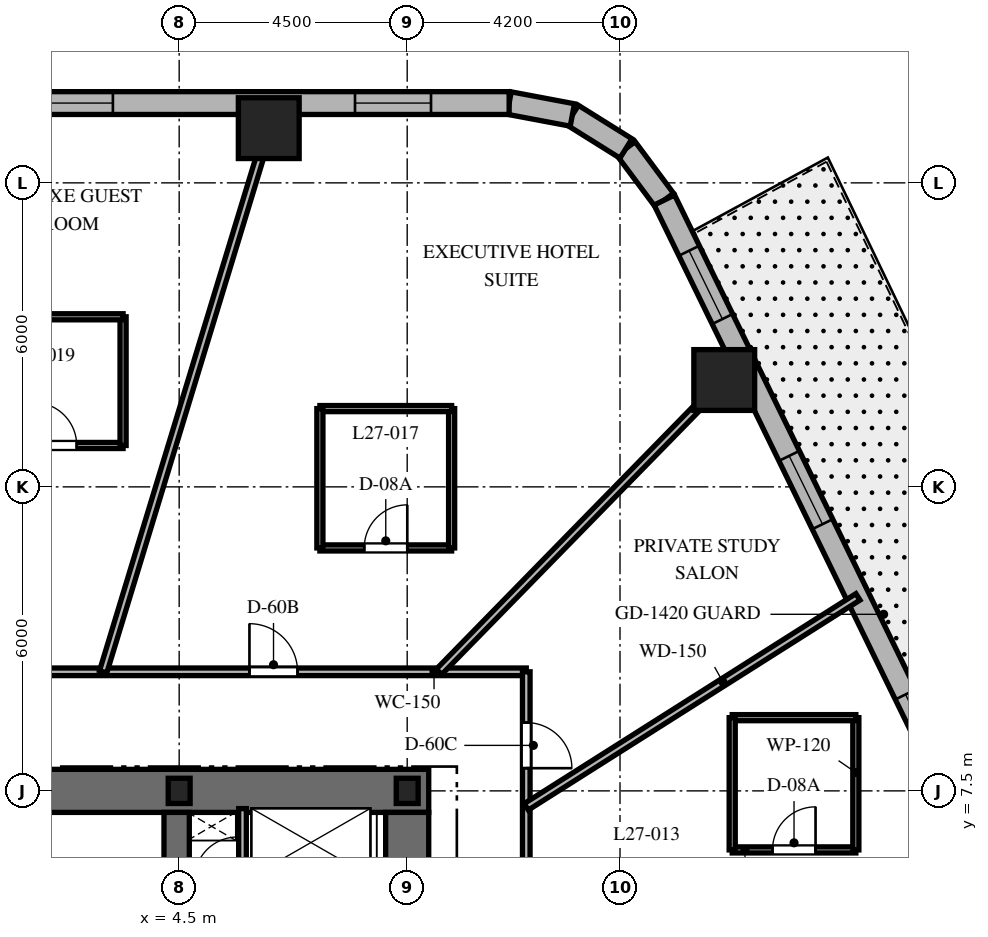
"""IFC4 building model, lengths in metres.
Left out: names, types, materials, properties, quantities, classifications, styles, units other than length and angle.
Written with IfcOpenShell. Run it as: python <this file> out.ifc"""

import sys

from ifc_helpers import new_model, si_unit, direction, frame, frame_2d, origin, origin_2d, place, context, subcontext, project, spatial, rectangle, i_section, extrude, element, fill, save


model = new_model("IFC4")
c1 = context("Model", 3, precision=1e-05, world=origin(), true_north=direction((0.0, 1.0)))
c2 = subcontext(c1, "Body", "Model", "MODEL_VIEW")
j1 = project(units=[si_unit("LENGTHUNIT", "METRE"), si_unit("PLANEANGLEUNIT", "RADIAN")], contexts=[c1])
p1 = place(None, origin())
s1 = spatial("IfcSite", under=j1, at=p1, CompositionType="ELEMENT")
p2 = place(p1, origin())
s2 = spatial("IfcBuilding", under=s1, at=p2, CompositionType="ELEMENT")
p3 = place(p2, frame((0.0, 0.0, 113.6)))
s3 = spatial("IfcBuildingStorey", under=s2, at=p3, CompositionType="ELEMENT", Elevation=113.6)
p4 = place(p3, frame((1.85, 7.5, 0.0), z_axis=(0.0, 0.0, 1.0), x_axis=(1.0, 0.0, 0.0)))
e1 = element("IfcWall", 1, at=p4, inside=s3, PredefinedType="SHEAR", context=c2, shape_type="SweptSolid", body=[
    extrude(rectangle(XDim=7.575, YDim=0.85, at=frame_2d((3.788, 0.0))), origin(), (0.0, 0.0, 1.0), 3.7),
])
p5 = place(p3, frame((9.0, -7.075, 0.0), z_axis=(0.0, 0.0, 1.0), x_axis=(0.0, 1.0, 0.0)))
e2 = element("IfcWall", 2, at=p5, inside=s3, PredefinedType="SHEAR", context=c2, shape_type="SweptSolid", body=[
    extrude(rectangle(XDim=14.15, YDim=0.85, at=frame_2d((7.075, 0.0))), origin(), (0.0, 0.0, 1.0), 3.7),
])
p6 = place(p5, frame((10.2, 0.0, 0.0)))
e3 = element("IfcOpeningElement", 3, at=p6, cuts=e2, PredefinedType="OPENING", context=c2, shape_type="SweptSolid", body=[
    extrude(rectangle(XDim=1.05, YDim=2.15, at=frame_2d((0.525, 1.075))), frame((0.0, 0.435, 0.0), z_axis=(0.0, -1.0, 0.0), x_axis=(1.0, 0.0, 0.0)), (0.0, 0.0, 1.0), 0.87),
])
p7 = place(p3, frame((4.45, 2.25, 0.0), z_axis=(0.0, 0.0, 1.0), x_axis=(0.0, 1.0, 0.0)))
e4 = element("IfcWall", 4, at=p7, inside=s3, PredefinedType="SHEAR", context=c2, shape_type="SweptSolid", body=[
    extrude(rectangle(XDim=4.825, YDim=0.5, at=frame_2d((2.413, 0.0))), origin(), (0.0, 0.0, 1.0), 3.7),
])
for number, where, z_axis, x_axis in (
    (5, (9.0, 7.5, 0.0), (0.0, 0.0, 1.0), (1.0, 0.0, 0.0)),
    (6, (4.5, 7.5, 0.0), (0.0, 0.0, 1.0), (1.0, 0.0, 0.0)),
):
    element("IfcColumn", number, at=place(p3, frame(where, z_axis=z_axis, x_axis=x_axis)), inside=s3, PredefinedType="COLUMN", context=c2, shape_type="SweptSolid", body=[
        extrude(i_section(OverallWidth=0.432, OverallDepth=0.498, WebThickness=0.056, FlangeThickness=0.089, at=origin_2d()), origin(), (0.0, 0.0, 1.0), 3.7),
    ])
for number, where, z_axis, x_axis in (
    (7, (15.257, 15.609, 0.0), (0.0, 0.0, 1.0), (1.0, 0.0, 0.0)),
    (8, (6.268, 20.58, 0.0), (0.0, 0.0, 1.0), (1.0, 0.0, 0.0)),
):
    element("IfcColumn", number, at=place(p3, frame(where, z_axis=z_axis, x_axis=x_axis)), inside=s3, PredefinedType="COLUMN", context=c2, shape_type="SweptSolid", body=[
        extrude(rectangle(XDim=1.2, YDim=1.2, at=origin_2d()), origin(), (0.0, 0.0, 1.0), 3.7),
    ])
p8 = place(p3, frame((14.076, 19.161, 0.0), z_axis=(0.0, 0.0, 1.0), x_axis=(-0.597226657159, 0.802072515412, 0.0)))
e9 = element("IfcWall", 9, at=p8, inside=s3, PredefinedType="SOLIDWALL", context=c2, shape_type="SweptSolid", body=[
    extrude(rectangle(XDim=1.269, YDim=0.45, at=frame_2d((0.635, 0.0))), origin(), (0.0, 0.0, 1.0), 3.4),
])
p9 = place(p3, frame((13.318, 20.179, 0.0), z_axis=(0.0, 0.0, 1.0), x_axis=(-0.848031272749, 0.529946186362, 0.0)))
e10 = element("IfcWall", 10, at=p9, inside=s3, PredefinedType="SOLIDWALL", context=c2, shape_type="SweptSolid", body=[
    extrude(rectangle(XDim=1.248, YDim=0.45, at=frame_2d((0.624, 0.0))), origin(), (0.0, 0.0, 1.0), 3.4),
])
p10 = place(p3, frame((12.259, 20.84, 0.0), z_axis=(0.0, 0.0, 1.0), x_axis=(-0.982730354425, 0.185043374624, 0.0)))
e11 = element("IfcWall", 11, at=p10, inside=s3, PredefinedType="SOLIDWALL", context=c2, shape_type="SweptSolid", body=[
    extrude(rectangle(XDim=1.269, YDim=0.45, at=frame_2d((0.635, 0.0))), origin(), (0.0, 0.0, 1.0), 3.4),
])
p11 = place(p3, frame((22.238, 2.427, 0.0), z_axis=(0.0, 0.0, 1.0), x_axis=(-0.438374803278, 0.898792262901, 0.0)))
e12 = element("IfcWall", 12, at=p11, inside=s3, PredefinedType="SOLIDWALL", context=c2, shape_type="SweptSolid", body=[
    extrude(rectangle(XDim=18.618, YDim=0.45, at=frame_2d((9.309, 0.0))), origin(), (0.0, 0.0, 1.0), 3.4),
])
p12 = place(p11, frame((4.62, 0.0, 0.0)))
e13 = element("IfcOpeningElement", 13, at=p12, cuts=e12, PredefinedType="OPENING", context=c2, shape_type="SweptSolid", body=[
    extrude(rectangle(XDim=1.0, YDim=2.15, at=frame_2d((0.5, 1.075))), frame((0.0, 0.235, 0.0), z_axis=(0.0, -1.0, 0.0), x_axis=(1.0, 0.0, 0.0)), (0.0, 0.0, 1.0), 0.47),
])
p13 = place(p11, frame((6.262, 0.0, 0.8)))
e14 = element("IfcOpeningElement", 14, at=p13, cuts=e12, PredefinedType="OPENING", context=c2, shape_type="SweptSolid", body=[
    extrude(rectangle(XDim=1.5, YDim=1.8, at=frame_2d((0.75, 0.9))), frame((0.0, 0.235, 0.0), z_axis=(0.0, -1.0, 0.0), x_axis=(1.0, 0.0, 0.0)), (0.0, 0.0, 1.0), 0.47),
])
p14 = place(p11, frame((11.501, 0.0, 0.8)))
e15 = element("IfcOpeningElement", 15, at=p14, cuts=e12, PredefinedType="OPENING", context=c2, shape_type="SweptSolid", body=[
    extrude(rectangle(XDim=1.5, YDim=1.8, at=frame_2d((0.75, 0.9))), frame((0.0, 0.235, 0.0), z_axis=(0.0, -1.0, 0.0), x_axis=(1.0, 0.0, 0.0)), (0.0, 0.0, 1.0), 0.47),
])
p15 = place(p11, frame((16.006, 0.0, 0.8)))
e16 = element("IfcOpeningElement", 16, at=p15, cuts=e12, PredefinedType="OPENING", context=c2, shape_type="SweptSolid", body=[
    extrude(rectangle(XDim=1.5, YDim=1.8, at=frame_2d((0.75, 0.9))), frame((0.0, 0.235, 0.0), z_axis=(0.0, -1.0, 0.0), x_axis=(1.0, 0.0, 0.0)), (0.0, 0.0, 1.0), 0.47),
])
p16 = place(p11, frame((1.163, 0.0, 0.8)))
e17 = element("IfcOpeningElement", 17, at=p16, cuts=e12, PredefinedType="OPENING", context=c2, shape_type="SweptSolid", body=[
    extrude(rectangle(XDim=1.5, YDim=1.8, at=frame_2d((0.75, 0.9))), frame((0.0, 0.235, 0.0), z_axis=(0.0, -1.0, 0.0), x_axis=(1.0, 0.0, 0.0)), (0.0, 0.0, 1.0), 0.47),
])
p17 = place(p3, frame((11.012, 21.075, 0.0), z_axis=(0.0, 0.0, 1.0), x_axis=(-1.0, 0.0, 0.0)))
e18 = element("IfcWall", 18, at=p17, inside=s3, PredefinedType="SOLIDWALL", context=c2, shape_type="SweptSolid", body=[
    extrude(rectangle(XDim=23.782, YDim=0.45, at=frame_2d((11.891, 0.0))), origin(), (0.0, 0.0, 1.0), 3.4),
])
p18 = place(p17, frame((1.542, 0.0, 0.8)))
e19 = element("IfcOpeningElement", 19, at=p18, cuts=e18, PredefinedType="OPENING", context=c2, shape_type="SweptSolid", body=[
    extrude(rectangle(XDim=1.5, YDim=1.8, at=frame_2d((0.75, 0.9))), frame((0.0, 0.235, 0.0), z_axis=(0.0, -1.0, 0.0), x_axis=(1.0, 0.0, 0.0)), (0.0, 0.0, 1.0), 0.47),
])
p19 = place(p17, frame((7.82, 0.0, 0.8)))
e20 = element("IfcOpeningElement", 20, at=p19, cuts=e18, PredefinedType="OPENING", context=c2, shape_type="SweptSolid", body=[
    extrude(rectangle(XDim=1.5, YDim=1.8, at=frame_2d((0.75, 0.9))), frame((0.0, 0.235, 0.0), z_axis=(0.0, -1.0, 0.0), x_axis=(1.0, 0.0, 0.0)), (0.0, 0.0, 1.0), 0.47),
])
p20 = place(p17, frame((14.388, 0.0, 0.8)))
e21 = element("IfcOpeningElement", 21, at=p20, cuts=e18, PredefinedType="OPENING", context=c2, shape_type="SweptSolid", body=[
    extrude(rectangle(XDim=1.5, YDim=1.8, at=frame_2d((0.75, 0.9))), frame((0.0, 0.235, 0.0), z_axis=(0.0, -1.0, 0.0), x_axis=(1.0, 0.0, 0.0)), (0.0, 0.0, 1.0), 0.47),
])
p21 = place(p17, frame((20.741, 0.0, 0.8)))
e22 = element("IfcOpeningElement", 22, at=p21, cuts=e18, PredefinedType="OPENING", context=c2, shape_type="SweptSolid", body=[
    extrude(rectangle(XDim=1.5, YDim=1.8, at=frame_2d((0.75, 0.9))), frame((0.0, 0.235, 0.0), z_axis=(0.0, -1.0, 0.0), x_axis=(1.0, 0.0, 0.0)), (0.0, 0.0, 1.0), 0.47),
])
p22 = place(p3, frame((5.75, 5.74, 0.0), z_axis=(0.0, 0.0, 1.0), x_axis=(0.0, 1.0, 0.0)))
e23 = element("IfcWall", 23, at=p22, inside=s3, PredefinedType="PARTITIONING", context=c2, shape_type="SweptSolid", body=[
    extrude(rectangle(XDim=1.41, YDim=0.15, at=frame_2d((0.705, 0.0))), origin(), (0.0, 0.0, 1.0), 3.4),
])
p23 = place(p3, frame((-11.35, 9.85, 0.0), z_axis=(0.0, 0.0, 1.0), x_axis=(1.0, 0.0, 0.0)))
e24 = element("IfcWall", 24, at=p23, inside=s3, PredefinedType="PARTITIONING", context=c2, shape_type="SweptSolid", body=[
    extrude(rectangle(XDim=22.7, YDim=0.15, at=frame_2d((11.35, 0.0))), origin(), (0.0, 0.0, 1.0), 2.84),
])
p24 = place(p23, frame((17.237, 0.0, 0.0)))
e25 = element("IfcOpeningElement", 25, at=p24, cuts=e24, PredefinedType="OPENING", context=c2, shape_type="SweptSolid", body=[
    extrude(rectangle(XDim=0.95, YDim=2.03, at=frame_2d((0.475, 1.015))), frame((0.0, 0.085, 0.0), z_axis=(0.0, -1.0, 0.0), x_axis=(1.0, 0.0, 0.0)), (0.0, 0.0, 1.0), 0.17),
])
p25 = place(p23, frame((12.192, 0.0, 0.0)))
e26 = element("IfcOpeningElement", 26, at=p25, cuts=e24, PredefinedType="OPENING", context=c2, shape_type="SweptSolid", body=[
    extrude(rectangle(XDim=0.95, YDim=2.03, at=frame_2d((0.475, 1.015))), frame((0.0, 0.085, 0.0), z_axis=(0.0, -1.0, 0.0), x_axis=(1.0, 0.0, 0.0)), (0.0, 0.0, 1.0), 0.17),
])
p26 = place(p23, frame((8.757, 0.0, 0.0)))
e27 = element("IfcOpeningElement", 27, at=p26, cuts=e24, PredefinedType="OPENING", context=c2, shape_type="SweptSolid", body=[
    extrude(rectangle(XDim=0.95, YDim=2.03, at=frame_2d((0.475, 1.015))), frame((0.0, 0.085, 0.0), z_axis=(0.0, -1.0, 0.0), x_axis=(1.0, 0.0, 0.0)), (0.0, 0.0, 1.0), 0.17),
])
p27 = place(p23, frame((3.399, 0.0, 0.0)))
e28 = element("IfcOpeningElement", 28, at=p27, cuts=e24, PredefinedType="OPENING", context=c2, shape_type="SweptSolid", body=[
    extrude(rectangle(XDim=0.95, YDim=2.03, at=frame_2d((0.475, 1.015))), frame((0.0, 0.085, 0.0), z_axis=(0.0, -1.0, 0.0), x_axis=(1.0, 0.0, 0.0)), (0.0, 0.0, 1.0), 0.17),
])
p28 = place(p3, frame((11.35, 9.85, 0.0), z_axis=(0.0, 0.0, 1.0), x_axis=(0.0, -1.0, 0.0)))
e29 = element("IfcWall", 29, at=p28, inside=s3, PredefinedType="PARTITIONING", context=c2, shape_type="SweptSolid", body=[
    extrude(rectangle(XDim=19.7, YDim=0.15, at=frame_2d((9.85, 0.0))), origin(), (0.0, 0.0, 1.0), 2.84),
])
p29 = place(p28, frame((4.199, 0.0, 0.0)))
e30 = element("IfcOpeningElement", 30, at=p29, cuts=e29, PredefinedType="OPENING", context=c2, shape_type="SweptSolid", body=[
    extrude(rectangle(XDim=0.95, YDim=2.03, at=frame_2d((0.475, 1.015))), frame((0.0, 0.085, 0.0), z_axis=(0.0, -1.0, 0.0), x_axis=(1.0, 0.0, 0.0)), (0.0, 0.0, 1.0), 0.17),
])
p30 = place(p28, frame((1.002, 0.0, 0.0)))
e31 = element("IfcOpeningElement", 31, at=p30, cuts=e29, PredefinedType="OPENING", context=c2, shape_type="SweptSolid", body=[
    extrude(rectangle(XDim=0.9, YDim=2.03, at=frame_2d((0.45, 1.015))), frame((0.0, 0.085, 0.0), z_axis=(0.0, -1.0, 0.0), x_axis=(1.0, 0.0, 0.0)), (0.0, 0.0, 1.0), 0.17),
])
p31 = place(p28, frame((17.197, 0.0, 0.0)))
e32 = element("IfcOpeningElement", 32, at=p31, cuts=e29, PredefinedType="OPENING", context=c2, shape_type="SweptSolid", body=[
    extrude(rectangle(XDim=0.9, YDim=2.03, at=frame_2d((0.45, 1.015))), frame((0.0, 0.085, 0.0), z_axis=(0.0, -1.0, 0.0), x_axis=(1.0, 0.0, 0.0)), (0.0, 0.0, 1.0), 0.17),
])
p32 = place(p28, frame((13.408, 0.0, 0.0)))
e33 = element("IfcOpeningElement", 33, at=p32, cuts=e29, PredefinedType="OPENING", context=c2, shape_type="SweptSolid", body=[
    extrude(rectangle(XDim=0.95, YDim=2.03, at=frame_2d((0.475, 1.015))), frame((0.0, 0.085, 0.0), z_axis=(0.0, -1.0, 0.0), x_axis=(1.0, 0.0, 0.0)), (0.0, 0.0, 1.0), 0.17),
])
p33 = place(p28, frame((8.836, 0.0, 0.0)))
e34 = element("IfcOpeningElement", 34, at=p33, cuts=e29, PredefinedType="OPENING", context=c2, shape_type="SweptSolid", body=[
    extrude(rectangle(XDim=0.95, YDim=2.03, at=frame_2d((0.475, 1.015))), frame((0.0, 0.085, 0.0), z_axis=(0.0, -1.0, 0.0), x_axis=(1.0, 0.0, 0.0)), (0.0, 0.0, 1.0), 0.17),
])
p34 = place(p3, frame((11.35, 7.185, 0.0), z_axis=(0.0, 0.0, 1.0), x_axis=(0.844928274737, 0.534879622485, 0.0)))
e35 = element("IfcWall", 35, at=p34, inside=s3, PredefinedType="PARTITIONING", context=c2, shape_type="SweptSolid", body=[
    extrude(rectangle(XDim=7.747, YDim=0.15, at=frame_2d((3.874, 0.0))), origin(), (0.0, 0.0, 1.0), 2.54),
])
p35 = place(p3, frame((9.628, 9.85, 0.0), z_axis=(0.0, 0.0, 1.0), x_axis=(0.698992824326, 0.715128681805, 0.0)))
e36 = element("IfcWall", 36, at=p35, inside=s3, PredefinedType="PARTITIONING", context=c2, shape_type="SweptSolid", body=[
    extrude(rectangle(XDim=8.579, YDim=0.15, at=frame_2d((4.29, 0.0))), origin(), (0.0, 0.0, 1.0), 2.54),
])
p36 = place(p3, frame((3.0, 9.85, 0.0), z_axis=(0.0, 0.0, 1.0), x_axis=(0.291352035382, 0.95661590593, 0.0)))
e37 = element("IfcWall", 37, at=p36, inside=s3, PredefinedType="PARTITIONING", context=c2, shape_type="SweptSolid", body=[
    extrude(rectangle(XDim=11.734, YDim=0.15, at=frame_2d((5.867, 0.0))), origin(), (0.0, 0.0, 1.0), 2.54),
])
p37 = place(p3, frame((15.414, 6.335, 0.0), z_axis=(0.0, 0.0, 1.0), x_axis=(1.0, 0.0, 0.0)))
e38 = element("IfcWall", 38, at=p37, inside=s3, PredefinedType="PARTITIONING", context=c2, shape_type="SweptSolid", body=[
    extrude(rectangle(XDim=2.44, YDim=0.12, at=frame_2d((1.22, 0.0))), origin(), (0.0, 0.0, 1.0), 2.84),
])
p38 = place(p37, frame((0.795, 0.0, 0.0)))
e39 = element("IfcOpeningElement", 39, at=p38, cuts=e38, PredefinedType="OPENING", context=c2, shape_type="SweptSolid", body=[
    extrude(rectangle(XDim=0.85, YDim=2.03, at=frame_2d((0.425, 1.015))), frame((0.0, 0.07, 0.0), z_axis=(0.0, -1.0, 0.0), x_axis=(1.0, 0.0, 0.0)), (0.0, 0.0, 1.0), 0.14),
])
p39 = place(p3, frame((17.854, 6.335, 0.0), z_axis=(0.0, 0.0, 1.0), x_axis=(0.0, 1.0, 0.0)))
e40 = element("IfcWall", 40, at=p39, inside=s3, PredefinedType="PARTITIONING", context=c2, shape_type="SweptSolid", body=[
    extrude(rectangle(XDim=2.61, YDim=0.12, at=frame_2d((1.305, 0.0))), origin(), (0.0, 0.0, 1.0), 3.4),
])
p40 = place(p3, frame((17.854, 8.945, 0.0), z_axis=(0.0, 0.0, 1.0), x_axis=(-1.0, 0.0, 0.0)))
e41 = element("IfcWall", 41, at=p40, inside=s3, PredefinedType="PARTITIONING", context=c2, shape_type="SweptSolid", body=[
    extrude(rectangle(XDim=2.44, YDim=0.12, at=frame_2d((1.22, 0.0))), origin(), (0.0, 0.0, 1.0), 3.4),
])
p41 = place(p3, frame((15.414, 8.945, 0.0), z_axis=(0.0, 0.0, 1.0), x_axis=(0.0, -1.0, 0.0)))
e42 = element("IfcWall", 42, at=p41, inside=s3, PredefinedType="PARTITIONING", context=c2, shape_type="SweptSolid", body=[
    extrude(rectangle(XDim=2.61, YDim=0.12, at=frame_2d((1.305, 0.0))), origin(), (0.0, 0.0, 1.0), 2.84),
])
p42 = place(p3, frame((7.277, 12.295, 0.0), z_axis=(0.0, 0.0, 1.0), x_axis=(1.0, 0.0, 0.0)))
e43 = element("IfcWall", 43, at=p42, inside=s3, PredefinedType="PARTITIONING", context=c2, shape_type="SweptSolid", body=[
    extrude(rectangle(XDim=2.6, YDim=0.12, at=frame_2d((1.3, 0.0))), origin(), (0.0, 0.0, 1.0), 2.84),
])
p43 = place(p42, frame((0.875, 0.0, 0.0)))
e44 = element("IfcOpeningElement", 44, at=p43, cuts=e43, PredefinedType="OPENING", context=c2, shape_type="SweptSolid", body=[
    extrude(rectangle(XDim=0.85, YDim=2.03, at=frame_2d((0.425, 1.015))), frame((0.0, 0.07, 0.0), z_axis=(0.0, -1.0, 0.0), x_axis=(1.0, 0.0, 0.0)), (0.0, 0.0, 1.0), 0.14),
])
p44 = place(p3, frame((9.877, 12.295, 0.0), z_axis=(0.0, 0.0, 1.0), x_axis=(0.0, 1.0, 0.0)))
e45 = element("IfcWall", 45, at=p44, inside=s3, PredefinedType="PARTITIONING", context=c2, shape_type="SweptSolid", body=[
    extrude(rectangle(XDim=2.75, YDim=0.12, at=frame_2d((1.375, 0.0))), origin(), (0.0, 0.0, 1.0), 2.972),
])
p45 = place(p3, frame((9.877, 15.045, 0.0), z_axis=(0.0, 0.0, 1.0), x_axis=(-1.0, 0.0, 0.0)))
e46 = element("IfcWall", 46, at=p45, inside=s3, PredefinedType="PARTITIONING", context=c2, shape_type="SweptSolid", body=[
    extrude(rectangle(XDim=2.6, YDim=0.12, at=frame_2d((1.3, 0.0))), origin(), (0.0, 0.0, 1.0), 2.972),
])
p46 = place(p3, frame((7.277, 15.045, 0.0), z_axis=(0.0, 0.0, 1.0), x_axis=(0.0, -1.0, 0.0)))
e47 = element("IfcWall", 47, at=p46, inside=s3, PredefinedType="PARTITIONING", context=c2, shape_type="SweptSolid", body=[
    extrude(rectangle(XDim=2.75, YDim=0.12, at=frame_2d((1.375, 0.0))), origin(), (0.0, 0.0, 1.0), 2.84),
])
p47 = place(p3, frame((0.713, 14.317, 0.0), z_axis=(0.0, 0.0, 1.0), x_axis=(1.0, 0.0, 0.0)))
e48 = element("IfcWall", 48, at=p47, inside=s3, PredefinedType="PARTITIONING", context=c2, shape_type="SweptSolid", body=[
    extrude(rectangle(XDim=2.68, YDim=0.12, at=frame_2d((1.34, 0.0))), origin(), (0.0, 0.0, 1.0), 3.4),
])
p48 = place(p47, frame((0.915, 0.0, 0.0)))
e49 = element("IfcOpeningElement", 49, at=p48, cuts=e48, PredefinedType="OPENING", context=c2, shape_type="SweptSolid", body=[
    extrude(rectangle(XDim=0.85, YDim=2.03, at=frame_2d((0.425, 1.015))), frame((0.0, 0.07, 0.0), z_axis=(0.0, -1.0, 0.0), x_axis=(1.0, 0.0, 0.0)), (0.0, 0.0, 1.0), 0.14),
])
p49 = place(p3, frame((3.393, 14.317, 0.0), z_axis=(0.0, 0.0, 1.0), x_axis=(0.0, 1.0, 0.0)))
e50 = element("IfcWall", 50, at=p49, inside=s3, PredefinedType="PARTITIONING", context=c2, shape_type="SweptSolid", body=[
    extrude(rectangle(XDim=2.54, YDim=0.12, at=frame_2d((1.27, 0.0))), origin(), (0.0, 0.0, 1.0), 2.84),
])
p50 = place(p3, frame((3.393, 16.857, 0.0), z_axis=(0.0, 0.0, 1.0), x_axis=(-1.0, 0.0, 0.0)))
e51 = element("IfcWall", 51, at=p50, inside=s3, PredefinedType="PARTITIONING", context=c2, shape_type="SweptSolid", body=[
    extrude(rectangle(XDim=2.68, YDim=0.12, at=frame_2d((1.34, 0.0))), origin(), (0.0, 0.0, 1.0), 3.4),
])
p51 = place(p13, origin())
e52 = element("IfcWindow", 52, at=p51, inside=s3, PartitioningType="SINGLE_PANEL", PredefinedType="WINDOW", context=c2, shape_type="SweptSolid", body=[
    extrude(rectangle(XDim=1.5, YDim=1.8, at=frame_2d((0.75, 0.9))), frame((0.0, 0.03, 0.0), z_axis=(0.0, -1.0, 0.0), x_axis=(1.0, 0.0, 0.0)), (0.0, 0.0, 1.0), 0.06),
])
fill(e14, e52)
p52 = place(p14, origin())
e53 = element("IfcWindow", 53, at=p52, inside=s3, PartitioningType="SINGLE_PANEL", PredefinedType="WINDOW", context=c2, shape_type="SweptSolid", body=[
    extrude(rectangle(XDim=1.5, YDim=1.8, at=frame_2d((0.75, 0.9))), frame((0.0, 0.03, 0.0), z_axis=(0.0, -1.0, 0.0), x_axis=(1.0, 0.0, 0.0)), (0.0, 0.0, 1.0), 0.06),
])
fill(e15, e53)
p53 = place(p15, origin())
e54 = element("IfcWindow", 54, at=p53, inside=s3, PartitioningType="SINGLE_PANEL", PredefinedType="WINDOW", context=c2, shape_type="SweptSolid", body=[
    extrude(rectangle(XDim=1.5, YDim=1.8, at=frame_2d((0.75, 0.9))), frame((0.0, 0.03, 0.0), z_axis=(0.0, -1.0, 0.0), x_axis=(1.0, 0.0, 0.0)), (0.0, 0.0, 1.0), 0.06),
])
fill(e16, e54)
p54 = place(p18, origin())
e55 = element("IfcWindow", 55, at=p54, inside=s3, PartitioningType="SINGLE_PANEL", PredefinedType="WINDOW", context=c2, shape_type="SweptSolid", body=[
    extrude(rectangle(XDim=1.5, YDim=1.8, at=frame_2d((0.75, 0.9))), frame((0.0, 0.03, 0.0), z_axis=(0.0, -1.0, 0.0), x_axis=(1.0, 0.0, 0.0)), (0.0, 0.0, 1.0), 0.06),
])
fill(e19, e55)
p55 = place(p19, origin())
e56 = element("IfcWindow", 56, at=p55, inside=s3, PartitioningType="SINGLE_PANEL", PredefinedType="WINDOW", context=c2, shape_type="SweptSolid", body=[
    extrude(rectangle(XDim=1.5, YDim=1.8, at=frame_2d((0.75, 0.9))), frame((0.0, 0.03, 0.0), z_axis=(0.0, -1.0, 0.0), x_axis=(1.0, 0.0, 0.0)), (0.0, 0.0, 1.0), 0.06),
])
fill(e20, e56)
p56 = place(p38, origin())
e57 = element("IfcDoor", 57, at=p56, inside=s3, OperationType="SINGLE_SWING_RIGHT", PredefinedType="DOOR", context=c2, shape_type="SweptSolid", body=[
    extrude(rectangle(XDim=0.85, YDim=2.03, at=frame_2d((0.425, 1.015))), frame((0.0, 0.025, 0.0), z_axis=(0.0, -1.0, 0.0), x_axis=(1.0, 0.0, 0.0)), (0.0, 0.0, 1.0), 0.05),
])
fill(e39, e57)
p57 = place(p30, origin())
e58 = element("IfcDoor", 58, at=p57, inside=s3, OperationType="SINGLE_SWING_RIGHT", PredefinedType="DOOR", context=c2, shape_type="SweptSolid", body=[
    extrude(rectangle(XDim=0.9, YDim=2.03, at=frame_2d((0.45, 1.015))), frame((0.0, 0.025, 0.0), z_axis=(0.0, -1.0, 0.0), x_axis=(1.0, 0.0, 0.0)), (0.0, 0.0, 1.0), 0.05),
])
fill(e31, e58)
p58 = place(p24, origin())
e59 = element("IfcDoor", 59, at=p58, inside=s3, OperationType="SINGLE_SWING_LEFT", PredefinedType="DOOR", context=c2, shape_type="SweptSolid", body=[
    extrude(rectangle(XDim=0.95, YDim=2.03, at=frame_2d((0.475, 1.015))), frame((0.0, 0.025, 0.0), z_axis=(0.0, -1.0, 0.0), x_axis=(1.0, 0.0, 0.0)), (0.0, 0.0, 1.0), 0.05),
])
fill(e25, e59)
p59 = place(p43, origin())
e60 = element("IfcDoor", 60, at=p59, inside=s3, OperationType="SINGLE_SWING_RIGHT", PredefinedType="DOOR", context=c2, shape_type="SweptSolid", body=[
    extrude(rectangle(XDim=0.85, YDim=2.03, at=frame_2d((0.425, 1.015))), frame((0.0, 0.025, 0.0), z_axis=(0.0, -1.0, 0.0), x_axis=(1.0, 0.0, 0.0)), (0.0, 0.0, 1.0), 0.05),
])
fill(e44, e60)
p60 = place(p48, origin())
e61 = element("IfcDoor", 61, at=p60, inside=s3, OperationType="SINGLE_SWING_LEFT", PredefinedType="DOOR", context=c2, shape_type="SweptSolid", body=[
    extrude(rectangle(XDim=0.85, YDim=2.03, at=frame_2d((0.425, 1.015))), frame((0.0, 0.025, 0.0), z_axis=(0.0, -1.0, 0.0), x_axis=(1.0, 0.0, 0.0)), (0.0, 0.0, 1.0), 0.05),
])
fill(e49, e61)
save(model, sys.argv[1])
